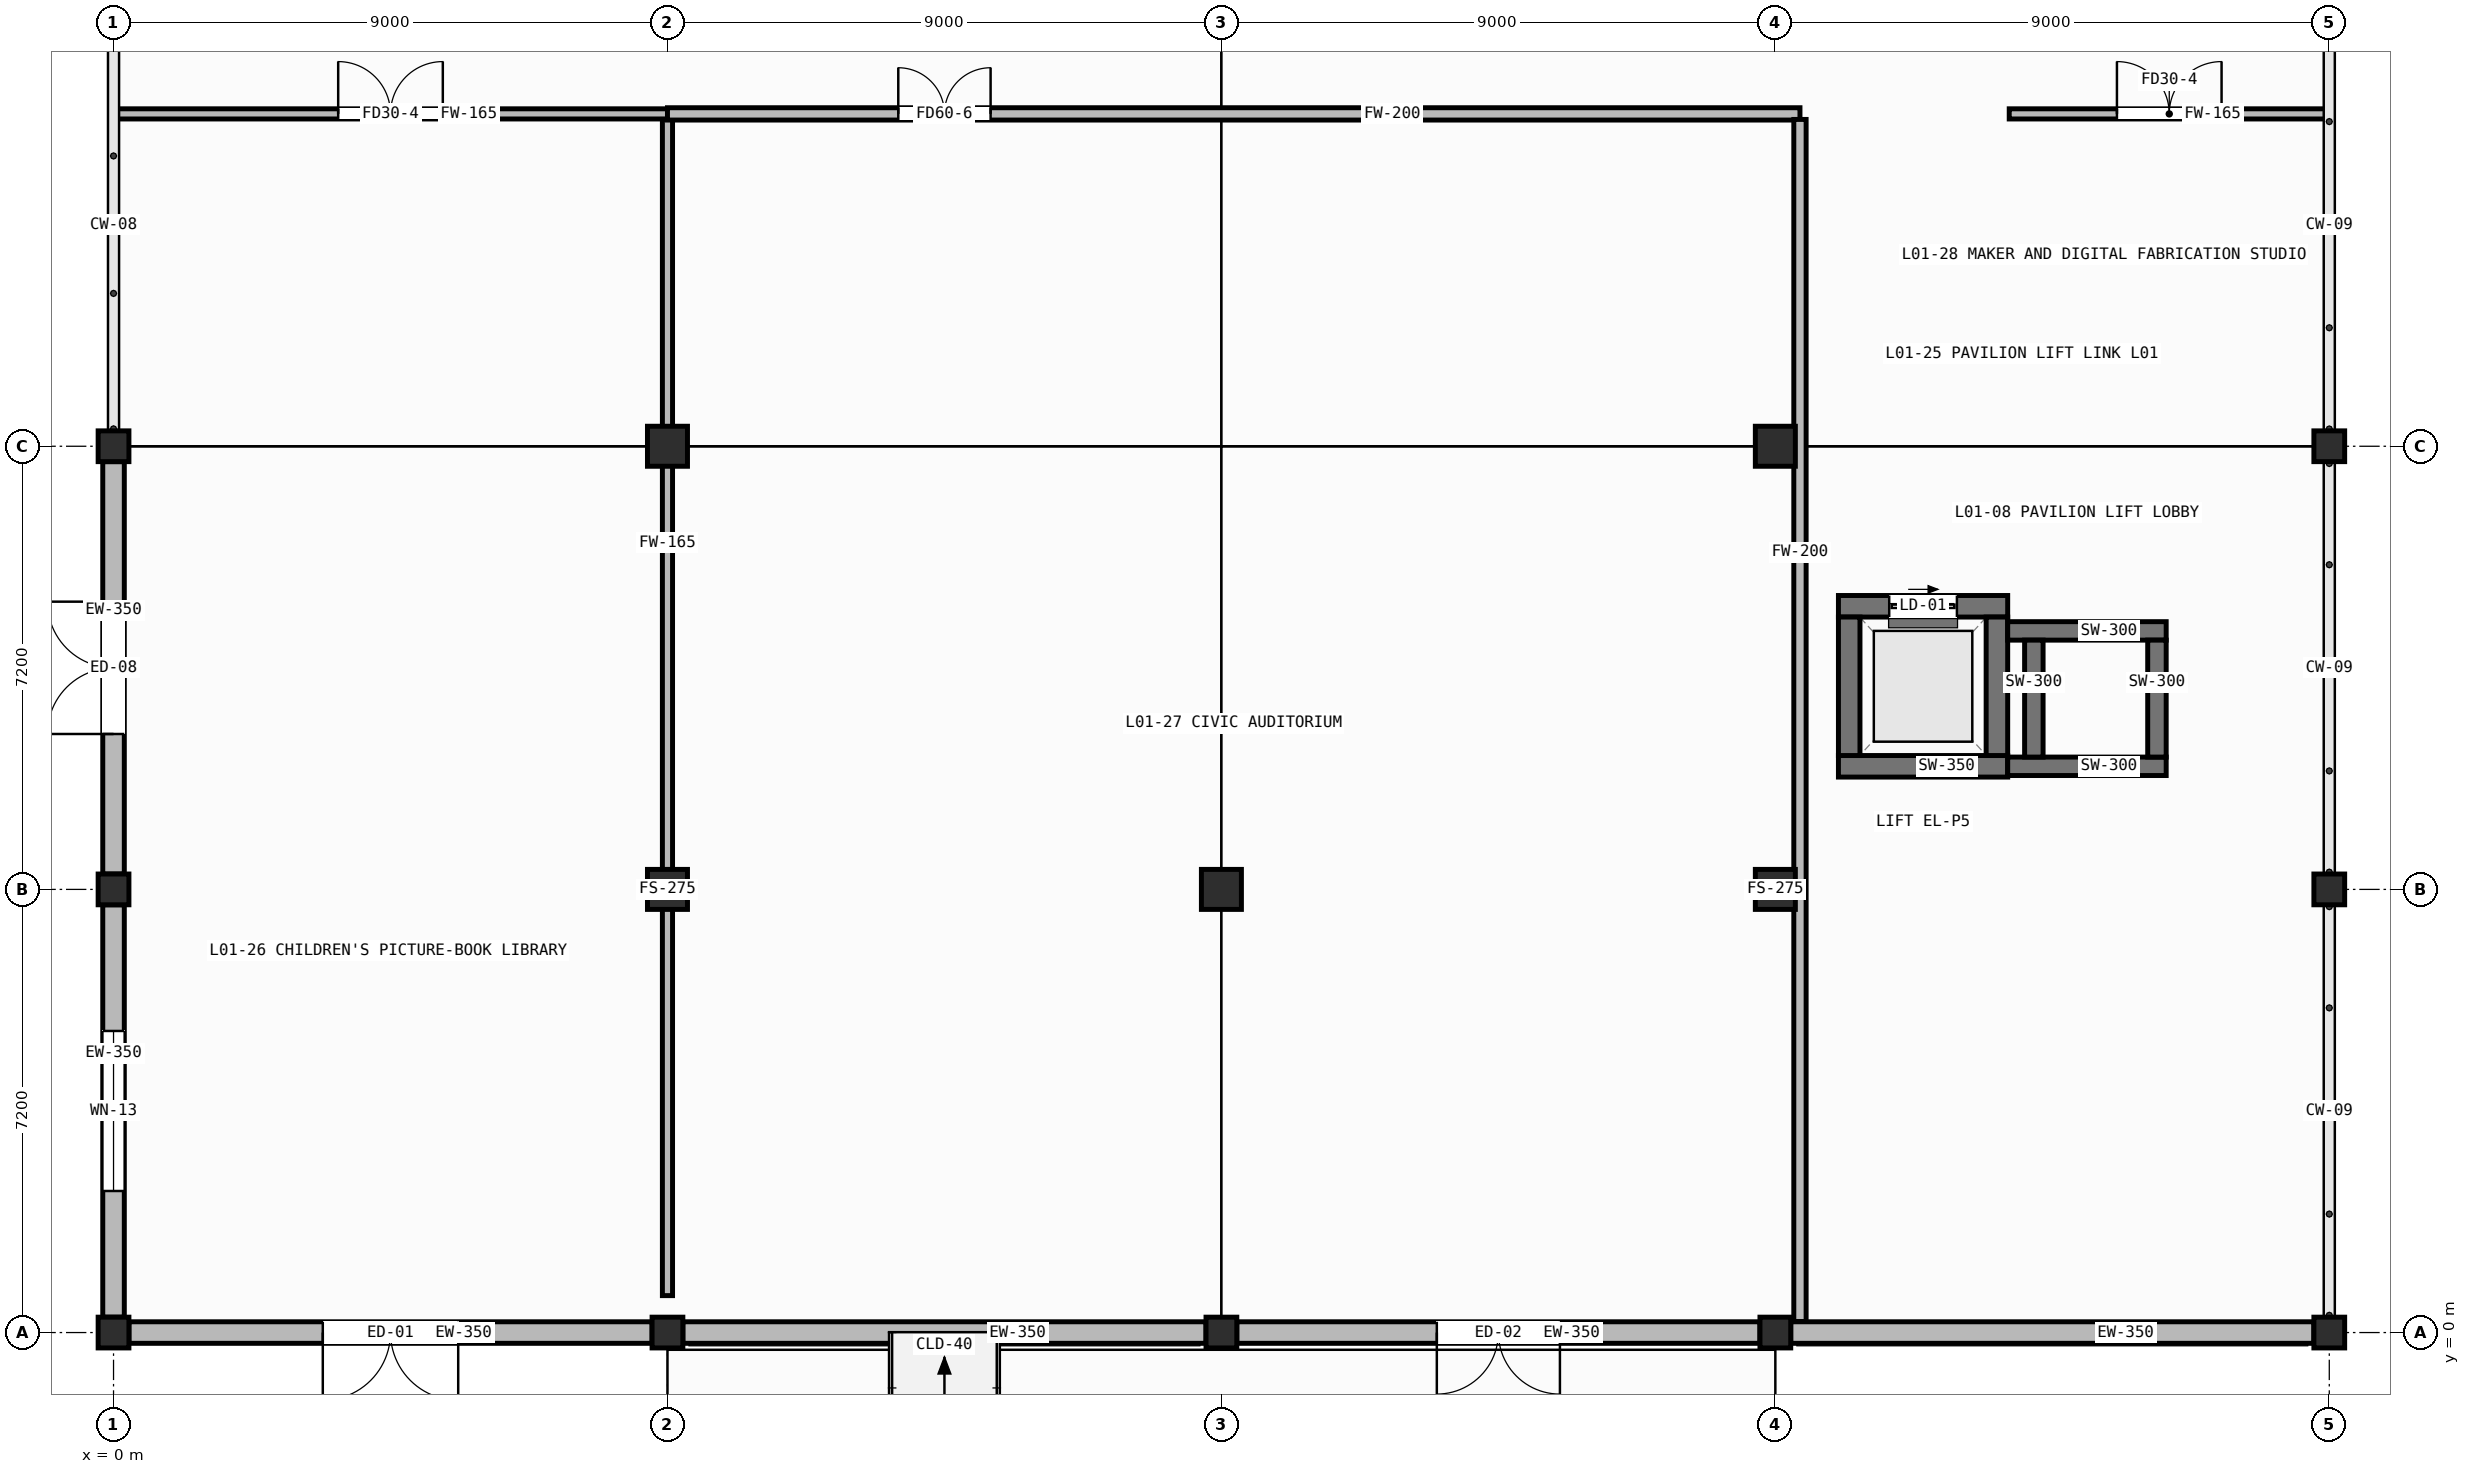
"""IFC4 building model, lengths in metres.
Left out: names, types, materials, properties, quantities, classifications, styles, units other than length and angle.
Written with IfcOpenShell. Run it as: python <this file> out.ifc"""

import sys

from ifc_helpers import new_model, si_unit, direction, frame, frame_2d, origin, origin_2d, place, context, subcontext, project, spatial, rectangle, hollow_rectangle, extrude, element, fill, save


model = new_model("IFC4")
c1 = context("Model", 3, precision=1e-05, world=origin(), true_north=direction((0.0, 1.0)))
c2 = subcontext(c1, "Body", "Model", "MODEL_VIEW")
j1 = project(units=[si_unit("LENGTHUNIT", "METRE"), si_unit("PLANEANGLEUNIT", "RADIAN")], contexts=[c1])
p1 = place(None, origin())
s1 = spatial("IfcSite", under=j1, at=p1, CompositionType="ELEMENT")
p2 = place(p1, origin())
s2 = spatial("IfcBuilding", under=s1, at=p2, CompositionType="ELEMENT")
p3 = place(p2, origin())
s3 = spatial("IfcBuildingStorey", under=s2, at=p3, CompositionType="ELEMENT", Elevation=0.0)
for number, where, z_axis, x_axis in (
    (1, (0.0, 0.0, 0.0), (0.0, 0.0, 1.0), (1.0, 0.0, 0.0)),
    (2, (0.0, 7.2, 0.0), (0.0, 0.0, 1.0), (1.0, 0.0, 0.0)),
    (3, (0.0, 14.4, 0.0), (0.0, 0.0, 1.0), (1.0, 0.0, 0.0)),
    (4, (9.0, 0.0, 0.0), (0.0, 0.0, 1.0), (1.0, 0.0, 0.0)),
):
    element("IfcColumn", number, at=place(p3, frame(where, z_axis=z_axis, x_axis=x_axis)), inside=s3, PredefinedType="COLUMN", context=c2, shape_type="SweptSolid", body=[
        extrude(hollow_rectangle(XDim=0.5, YDim=0.5, WallThickness=0.022, at=origin_2d()), origin(), (0.0, 0.0, 1.0), 4.8),
    ])
for number, where, z_axis, x_axis in (
    (5, (9.0, 7.2, 0.0), (0.0, 0.0, 1.0), (1.0, 0.0, 0.0)),
    (6, (9.0, 14.4, 0.0), (0.0, 0.0, 1.0), (1.0, 0.0, 0.0)),
):
    element("IfcColumn", number, at=place(p3, frame(where, z_axis=z_axis, x_axis=x_axis)), inside=s3, PredefinedType="COLUMN", context=c2, shape_type="SweptSolid", body=[
        extrude(hollow_rectangle(XDim=0.65, YDim=0.65, WallThickness=0.025, at=origin_2d()), origin(), (0.0, 0.0, 1.0), 4.8),
    ])
p4 = place(p3, frame((18.0, 0.0, 0.0), z_axis=(0.0, 0.0, 1.0), x_axis=(1.0, 0.0, 0.0)))
e7 = element("IfcColumn", 7, at=p4, inside=s3, PredefinedType="COLUMN", context=c2, shape_type="SweptSolid", body=[
    extrude(hollow_rectangle(XDim=0.5, YDim=0.5, WallThickness=0.022, at=origin_2d()), origin(), (0.0, 0.0, 1.0), 4.8),
])
p5 = place(p3, frame((18.0, 7.2, 0.0), z_axis=(0.0, 0.0, 1.0), x_axis=(1.0, 0.0, 0.0)))
e8 = element("IfcColumn", 8, at=p5, inside=s3, PredefinedType="COLUMN", context=c2, shape_type="SweptSolid", body=[
    extrude(hollow_rectangle(XDim=0.65, YDim=0.65, WallThickness=0.025, at=origin_2d()), origin(), (0.0, 0.0, 1.0), 4.8),
])
p6 = place(p3, frame((27.0, 0.0, 0.0), z_axis=(0.0, 0.0, 1.0), x_axis=(1.0, 0.0, 0.0)))
e9 = element("IfcColumn", 9, at=p6, inside=s3, PredefinedType="COLUMN", context=c2, shape_type="SweptSolid", body=[
    extrude(hollow_rectangle(XDim=0.5, YDim=0.5, WallThickness=0.022, at=origin_2d()), origin(), (0.0, 0.0, 1.0), 4.8),
])
for number, where, z_axis, x_axis in (
    (10, (27.0, 7.2, 0.0), (0.0, 0.0, 1.0), (1.0, 0.0, 0.0)),
    (11, (27.0, 14.4, 0.0), (0.0, 0.0, 1.0), (1.0, 0.0, 0.0)),
):
    element("IfcColumn", number, at=place(p3, frame(where, z_axis=z_axis, x_axis=x_axis)), inside=s3, PredefinedType="COLUMN", context=c2, shape_type="SweptSolid", body=[
        extrude(hollow_rectangle(XDim=0.65, YDim=0.65, WallThickness=0.025, at=origin_2d()), origin(), (0.0, 0.0, 1.0), 4.8),
    ])
for number, where, z_axis, x_axis in (
    (12, (36.0, 0.0, 0.0), (0.0, 0.0, 1.0), (1.0, 0.0, 0.0)),
    (13, (36.0, 7.2, 0.0), (0.0, 0.0, 1.0), (1.0, 0.0, 0.0)),
    (14, (36.0, 14.4, 0.0), (0.0, 0.0, 1.0), (1.0, 0.0, 0.0)),
):
    element("IfcColumn", number, at=place(p3, frame(where, z_axis=z_axis, x_axis=x_axis)), inside=s3, PredefinedType="COLUMN", context=c2, shape_type="SweptSolid", body=[
        extrude(hollow_rectangle(XDim=0.5, YDim=0.5, WallThickness=0.022, at=origin_2d()), origin(), (0.0, 0.0, 1.0), 4.8),
    ])
p7 = place(p3, frame((0.25, 0.0, 0.0), z_axis=(0.0, 0.0, 1.0), x_axis=(1.0, 0.0, 0.0)))
e15 = element("IfcWall", 15, at=p7, inside=s3, PredefinedType="STANDARD", context=c2, shape_type="SweptSolid", body=[
    extrude(rectangle(XDim=8.5, YDim=0.35, at=frame_2d((4.25, 0.0))), origin(), (0.0, 0.0, 1.0), 4.055),
])
p8 = place(p7, frame((3.15, 0.0, 0.0)))
e16 = element("IfcOpeningElement", 16, at=p8, cuts=e15, PredefinedType="OPENING", context=c2, shape_type="SweptSolid", body=[
    extrude(rectangle(XDim=2.2, YDim=2.5, at=frame_2d((1.1, 1.25))), frame((0.0, 0.187, 0.0), z_axis=(0.0, -1.0, 0.0), x_axis=(1.0, 0.0, 0.0)), (0.0, 0.0, 1.0), 0.374),
])
p9 = place(p3, frame((9.25, 0.0, 0.0), z_axis=(0.0, 0.0, 1.0), x_axis=(1.0, 0.0, 0.0)))
e17 = element("IfcWall", 17, at=p9, inside=s3, PredefinedType="STANDARD", context=c2, shape_type="SweptSolid", body=[
    extrude(rectangle(XDim=8.5, YDim=0.35, at=frame_2d((4.25, 0.0))), origin(), (0.0, 0.0, 1.0), 4.055),
])
p10 = place(p3, frame((18.25, 0.0, 0.0), z_axis=(0.0, 0.0, 1.0), x_axis=(1.0, 0.0, 0.0)))
e18 = element("IfcWall", 18, at=p10, inside=s3, PredefinedType="STANDARD", context=c2, shape_type="SweptSolid", body=[
    extrude(rectangle(XDim=8.5, YDim=0.35, at=frame_2d((4.25, 0.0))), origin(), (0.0, 0.0, 1.0), 4.055),
])
p11 = place(p10, frame((3.25, 0.0, 0.0)))
e19 = element("IfcOpeningElement", 19, at=p11, cuts=e18, PredefinedType="OPENING", context=c2, shape_type="SweptSolid", body=[
    extrude(rectangle(XDim=2.0, YDim=2.45, at=frame_2d((1.0, 1.225))), frame((0.0, 0.187, 0.0), z_axis=(0.0, -1.0, 0.0), x_axis=(1.0, 0.0, 0.0)), (0.0, 0.0, 1.0), 0.374),
])
p12 = place(p3, frame((27.25, 0.0, 0.0), z_axis=(0.0, 0.0, 1.0), x_axis=(1.0, 0.0, 0.0)))
e20 = element("IfcWall", 20, at=p12, inside=s3, PredefinedType="STANDARD", context=c2, shape_type="SweptSolid", body=[
    extrude(rectangle(XDim=8.5, YDim=0.35, at=frame_2d((4.25, 0.0))), origin(), (0.0, 0.0, 1.0), 4.055),
])
p13 = place(p3, frame((0.0, 0.25, 0.0), z_axis=(0.0, 0.0, 1.0), x_axis=(0.0, 1.0, 0.0)))
e21 = element("IfcWall", 21, at=p13, inside=s3, PredefinedType="STANDARD", context=c2, shape_type="SweptSolid", body=[
    extrude(rectangle(XDim=6.7, YDim=0.35, at=frame_2d((3.35, 0.0))), origin(), (0.0, 0.0, 1.0), 4.055),
])
p14 = place(p13, frame((2.05, 0.0, 0.85)))
e22 = element("IfcOpeningElement", 22, at=p14, cuts=e21, PredefinedType="OPENING", context=c2, shape_type="SweptSolid", body=[
    extrude(rectangle(XDim=2.6, YDim=1.6, at=frame_2d((1.3, 0.8))), frame((0.0, 0.187, 0.0), z_axis=(0.0, -1.0, 0.0), x_axis=(1.0, 0.0, 0.0)), (0.0, 0.0, 1.0), 0.374),
])
p15 = place(p3, frame((0.0, 7.45, 0.0), z_axis=(0.0, 0.0, 1.0), x_axis=(0.0, 1.0, 0.0)))
e23 = element("IfcWall", 23, at=p15, inside=s3, PredefinedType="STANDARD", context=c2, shape_type="SweptSolid", body=[
    extrude(rectangle(XDim=6.7, YDim=0.35, at=frame_2d((3.35, 0.0))), origin(), (0.0, 0.0, 1.0), 4.055),
])
p16 = place(p15, frame((2.275, 0.0, 0.0)))
e24 = element("IfcOpeningElement", 24, at=p16, cuts=e23, PredefinedType="OPENING", context=c2, shape_type="SweptSolid", body=[
    extrude(rectangle(XDim=2.15, YDim=2.48, at=frame_2d((1.075, 1.24))), frame((0.0, 0.187, 0.0), z_axis=(0.0, -1.0, 0.0), x_axis=(1.0, 0.0, 0.0)), (0.0, 0.0, 1.0), 0.374),
])
p17 = place(p3, frame((28.025, 9.2, 0.0), z_axis=(0.0, 0.0, 1.0), x_axis=(1.0, 0.0, 0.0)))
e25 = element("IfcWall", 25, at=p17, inside=s3, PredefinedType="SHEAR", context=c2, shape_type="SweptSolid", body=[
    extrude(rectangle(XDim=2.75, YDim=0.35, at=frame_2d((1.375, 0.0))), origin(), (0.0, 0.0, 1.0), 4.555),
])
p18 = place(p3, frame((28.025, 11.8, 0.0), z_axis=(0.0, 0.0, 1.0), x_axis=(1.0, 0.0, 0.0)))
e26 = element("IfcWall", 26, at=p18, inside=s3, PredefinedType="SHEAR", context=c2, shape_type="SweptSolid", body=[
    extrude(rectangle(XDim=2.75, YDim=0.35, at=frame_2d((1.375, 0.0))), origin(), (0.0, 0.0, 1.0), 4.555),
])
p19 = place(p18, frame((0.825, 0.0, 0.0)))
e27 = element("IfcOpeningElement", 27, at=p19, cuts=e26, PredefinedType="OPENING", context=c2, shape_type="SweptSolid", body=[
    extrude(rectangle(XDim=1.1, YDim=2.1, at=frame_2d((0.55, 1.05))), frame((0.0, 0.187, 0.0), z_axis=(0.0, -1.0, 0.0), x_axis=(1.0, 0.0, 0.0)), (0.0, 0.0, 1.0), 0.374),
])
for number, where, z_axis, x_axis in (
    (28, (28.2, 9.375, 0.0), (0.0, 0.0, 1.0), (0.0, 1.0, 0.0)),
    (29, (30.6, 9.375, 0.0), (0.0, 0.0, 1.0), (0.0, 1.0, 0.0)),
):
    element("IfcWall", number, at=place(p3, frame(where, z_axis=z_axis, x_axis=x_axis)), inside=s3, PredefinedType="SHEAR", context=c2, shape_type="SweptSolid", body=[
        extrude(rectangle(XDim=2.25, YDim=0.35, at=frame_2d((1.125, 0.0))), origin(), (0.0, 0.0, 1.0), 4.555),
    ])
for number, where, z_axis, x_axis in (
    (30, (30.775, 9.2, 0.0), (0.0, 0.0, 1.0), (1.0, 0.0, 0.0)),
    (31, (30.775, 11.4, 0.0), (0.0, 0.0, 1.0), (1.0, 0.0, 0.0)),
):
    element("IfcWall", number, at=place(p3, frame(where, z_axis=z_axis, x_axis=x_axis)), inside=s3, PredefinedType="SHEAR", context=c2, shape_type="SweptSolid", body=[
        extrude(rectangle(XDim=2.575, YDim=0.3, at=frame_2d((1.288, 0.0))), origin(), (0.0, 0.0, 1.0), 4.555),
    ])
for number, where, z_axis, x_axis in (
    (32, (31.2, 9.35, 0.0), (0.0, 0.0, 1.0), (0.0, 1.0, 0.0)),
    (33, (33.2, 9.35, 0.0), (0.0, 0.0, 1.0), (0.0, 1.0, 0.0)),
):
    element("IfcWall", number, at=place(p3, frame(where, z_axis=z_axis, x_axis=x_axis)), inside=s3, PredefinedType="SHEAR", context=c2, shape_type="SweptSolid", body=[
        extrude(rectangle(XDim=1.9, YDim=0.3, at=frame_2d((0.95, 0.0))), origin(), (0.0, 0.0, 1.0), 4.555),
    ])
p20 = place(p3, frame((0.035, 19.8, 0.0), z_axis=(0.0, 0.0, 1.0), x_axis=(1.0, 0.0, 0.0)))
e34 = element("IfcWall", 34, at=p20, inside=s3, PredefinedType="PARTITIONING", context=c2, shape_type="SweptSolid", body=[
    extrude(rectangle(XDim=8.965, YDim=0.165, at=frame_2d((4.482, 0.0))), origin(), (0.0, 0.0, 1.0), 4.555),
])
p21 = place(p20, frame((3.615, 0.0, 0.0)))
e35 = element("IfcOpeningElement", 35, at=p21, cuts=e34, PredefinedType="OPENING", context=c2, shape_type="SweptSolid", body=[
    extrude(rectangle(XDim=1.7, YDim=2.12, at=frame_2d((0.85, 1.06))), frame((0.0, 0.094, 0.0), z_axis=(0.0, -1.0, 0.0), x_axis=(1.0, 0.0, 0.0)), (0.0, 0.0, 1.0), 0.189),
])
p22 = place(p3, frame((9.0, 0.6, 0.0), z_axis=(0.0, 0.0, 1.0), x_axis=(0.0, 1.0, 0.0)))
e36 = element("IfcWall", 36, at=p22, inside=s3, PredefinedType="PARTITIONING", context=c2, shape_type="SweptSolid", body=[
    extrude(rectangle(XDim=19.11, YDim=0.165, at=frame_2d((9.555, 0.0))), origin(), (0.0, 0.0, 1.0), 3.835),
])
p23 = place(p3, frame((9.0, 19.8, 0.0), z_axis=(0.0, 0.0, 1.0), x_axis=(1.0, 0.0, 0.0)))
e37 = element("IfcWall", 37, at=p23, inside=s3, PredefinedType="PARTITIONING", context=c2, shape_type="SweptSolid", body=[
    extrude(rectangle(XDim=18.4, YDim=0.2, at=frame_2d((9.2, 0.0))), origin(), (0.0, 0.0, 1.0), 4.555),
])
p24 = place(p23, frame((3.75, 0.0, 0.0)))
e38 = element("IfcOpeningElement", 38, at=p24, cuts=e37, PredefinedType="OPENING", context=c2, shape_type="SweptSolid", body=[
    extrude(rectangle(XDim=1.5, YDim=2.1, at=frame_2d((0.75, 1.05))), frame((0.0, 0.112, 0.0), z_axis=(0.0, -1.0, 0.0), x_axis=(1.0, 0.0, 0.0)), (0.0, 0.0, 1.0), 0.224),
])
p25 = place(p3, frame((27.4, 0.18, 0.0), z_axis=(0.0, 0.0, 1.0), x_axis=(0.0, 1.0, 0.0)))
e39 = element("IfcWall", 39, at=p25, inside=s3, PredefinedType="PARTITIONING", context=c2, shape_type="SweptSolid", body=[
    extrude(rectangle(XDim=19.53, YDim=0.2, at=frame_2d((9.765, 0.0))), origin(), (0.0, 0.0, 1.0), 4.555),
])
p26 = place(p3, frame((30.8, 19.8, 0.0), z_axis=(0.0, 0.0, 1.0), x_axis=(1.0, 0.0, 0.0)))
e40 = element("IfcWall", 40, at=p26, inside=s3, PredefinedType="PARTITIONING", context=c2, shape_type="SweptSolid", body=[
    extrude(rectangle(XDim=5.165, YDim=0.165, at=frame_2d((2.583, 0.0))), origin(), (0.0, 0.0, 1.0), 4.555),
])
p27 = place(p26, frame((1.75, 0.0, 0.0)))
e41 = element("IfcOpeningElement", 41, at=p27, cuts=e40, PredefinedType="OPENING", context=c2, shape_type="SweptSolid", body=[
    extrude(rectangle(XDim=1.7, YDim=2.12, at=frame_2d((0.85, 1.06))), frame((0.0, 0.094, 0.0), z_axis=(0.0, -1.0, 0.0), x_axis=(1.0, 0.0, 0.0)), (0.0, 0.0, 1.0), 0.189),
])
p28 = place(p8, frame((2.2, 0.0, 0.0), z_axis=(0.0, 0.0, 1.0), x_axis=(-1.0, 0.0, 0.0)))
e42 = element("IfcDoor", 42, at=p28, inside=s3, OperationType="DOUBLE_DOOR_SINGLE_SWING", PredefinedType="DOOR", context=c2, shape_type="SweptSolid", body=[
    extrude(rectangle(XDim=2.2, YDim=2.5, at=frame_2d((1.1, 1.25))), frame((0.0, 0.025, 0.0), z_axis=(0.0, -1.0, 0.0), x_axis=(1.0, 0.0, 0.0)), (0.0, 0.0, 1.0), 0.05),
])
fill(e16, e42)
p29 = place(p11, frame((2.0, 0.0, 0.0), z_axis=(0.0, 0.0, 1.0), x_axis=(-1.0, 0.0, 0.0)))
e43 = element("IfcDoor", 43, at=p29, inside=s3, OperationType="DOUBLE_DOOR_SINGLE_SWING", PredefinedType="DOOR", context=c2, shape_type="SweptSolid", body=[
    extrude(rectangle(XDim=2.0, YDim=2.45, at=frame_2d((1.0, 1.225))), frame((0.0, 0.025, 0.0), z_axis=(0.0, -1.0, 0.0), x_axis=(1.0, 0.0, 0.0)), (0.0, 0.0, 1.0), 0.05),
])
fill(e19, e43)
p30 = place(p14, origin())
e44 = element("IfcWindow", 44, at=p30, inside=s3, PartitioningType="DOUBLE_PANEL_VERTICAL", PredefinedType="WINDOW", context=c2, shape_type="SweptSolid", body=[
    extrude(rectangle(XDim=2.6, YDim=1.6, at=frame_2d((1.3, 0.8))), frame((0.0, 0.03, 0.0), z_axis=(0.0, -1.0, 0.0), x_axis=(1.0, 0.0, 0.0)), (0.0, 0.0, 1.0), 0.06),
])
fill(e22, e44)
p31 = place(p16, origin())
e45 = element("IfcDoor", 45, at=p31, inside=s3, OperationType="DOUBLE_DOOR_SINGLE_SWING", PredefinedType="DOOR", context=c2, shape_type="SweptSolid", body=[
    extrude(rectangle(XDim=2.15, YDim=2.48, at=frame_2d((1.075, 1.24))), frame((0.0, 0.025, 0.0), z_axis=(0.0, -1.0, 0.0), x_axis=(1.0, 0.0, 0.0)), (0.0, 0.0, 1.0), 0.05),
])
fill(e24, e45)
p32 = place(p19, origin())
e46 = element("IfcDoor", 46, at=p32, inside=s3, OperationType="SLIDING_TO_RIGHT", PredefinedType="DOOR", context=c2, shape_type="SweptSolid", body=[
    extrude(rectangle(XDim=1.1, YDim=2.1, at=frame_2d((0.55, 1.05))), frame((0.0, 0.025, 0.0), z_axis=(0.0, -1.0, 0.0), x_axis=(1.0, 0.0, 0.0)), (0.0, 0.0, 1.0), 0.05),
])
fill(e27, e46)
p33 = place(p21, origin())
e47 = element("IfcDoor", 47, at=p33, inside=s3, OperationType="DOUBLE_DOOR_SINGLE_SWING", PredefinedType="DOOR", context=c2, shape_type="SweptSolid", body=[
    extrude(rectangle(XDim=1.7, YDim=2.12, at=frame_2d((0.85, 1.06))), frame((0.0, 0.025, 0.0), z_axis=(0.0, -1.0, 0.0), x_axis=(1.0, 0.0, 0.0)), (0.0, 0.0, 1.0), 0.05),
])
fill(e35, e47)
p34 = place(p24, origin())
e48 = element("IfcDoor", 48, at=p34, inside=s3, OperationType="DOUBLE_DOOR_SINGLE_SWING", PredefinedType="DOOR", context=c2, shape_type="SweptSolid", body=[
    extrude(rectangle(XDim=1.5, YDim=2.1, at=frame_2d((0.75, 1.05))), frame((0.0, 0.025, 0.0), z_axis=(0.0, -1.0, 0.0), x_axis=(1.0, 0.0, 0.0)), (0.0, 0.0, 1.0), 0.05),
])
fill(e38, e48)
p35 = place(p27, origin())
e49 = element("IfcDoor", 49, at=p35, inside=s3, OperationType="DOUBLE_DOOR_SINGLE_SWING", PredefinedType="DOOR", context=c2, shape_type="SweptSolid", body=[
    extrude(rectangle(XDim=1.7, YDim=2.12, at=frame_2d((0.85, 1.06))), frame((0.0, 0.025, 0.0), z_axis=(0.0, -1.0, 0.0), x_axis=(1.0, 0.0, 0.0)), (0.0, 0.0, 1.0), 0.05),
])
fill(e41, e49)
save(model, sys.argv[1])
